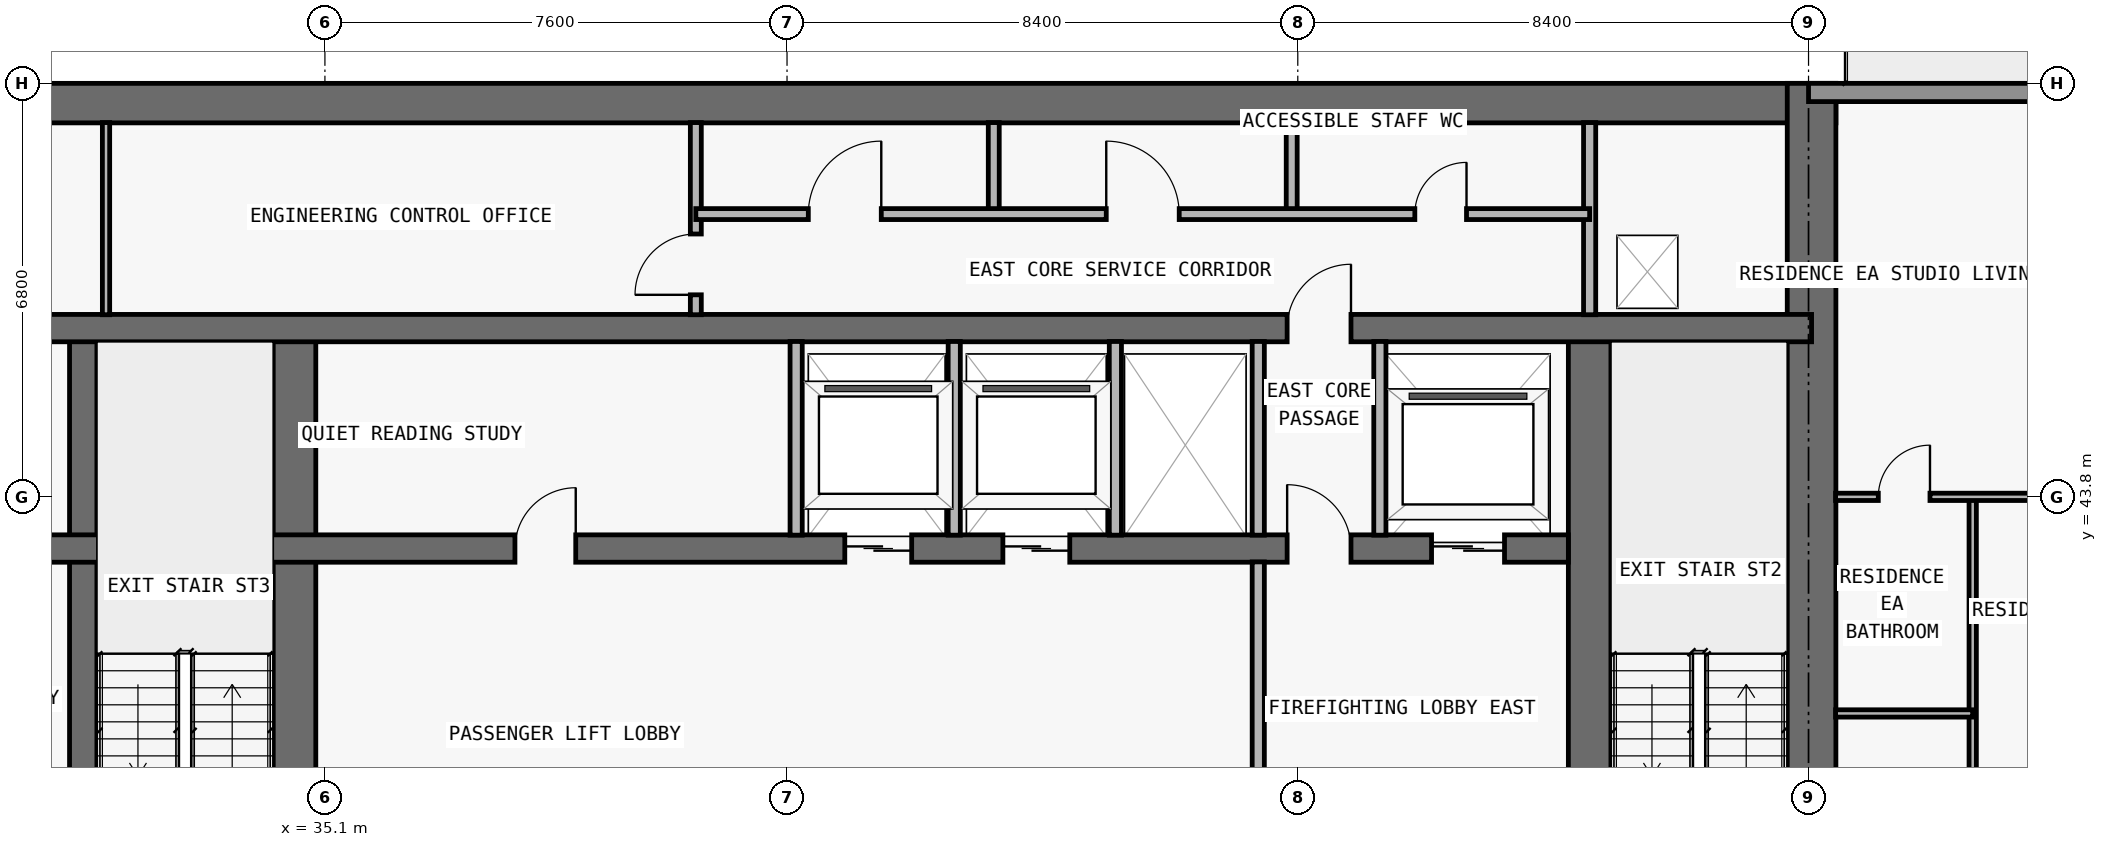
"""IFC4 building model, lengths in metres.
Left out: names, types, materials, properties, quantities, classifications, styles, units other than length and angle.
Written with IfcOpenShell. Run it as: python <this file> out.ifc"""

import sys

from ifc_helpers import new_model, si_unit, direction, frame, frame_2d, origin, place, context, subcontext, project, spatial, rectangle, extrude, element, fill, save


model = new_model("IFC4")
c1 = context("Model", 3, precision=1e-05, world=origin(), true_north=direction((0.0, 1.0)))
c2 = subcontext(c1, "Body", "Model", "MODEL_VIEW")
j1 = project(units=[si_unit("LENGTHUNIT", "METRE"), si_unit("PLANEANGLEUNIT", "RADIAN")], contexts=[c1])
p1 = place(None, origin())
s1 = spatial("IfcSite", under=j1, at=p1, CompositionType="ELEMENT")
p2 = place(p1, origin())
s2 = spatial("IfcBuilding", under=s1, at=p2, CompositionType="ELEMENT")
p3 = place(p2, frame((0.0, 0.0, 142.2)))
s3 = spatial("IfcBuildingStorey", under=s2, at=p3, CompositionType="ELEMENT", Elevation=142.2)
p4 = place(p3, frame((17.85, 50.275, 0.0), z_axis=(0.0, 0.0, 1.0), x_axis=(1.0, 0.0, 0.0)))
e1 = element("IfcWall", 1, at=p4, inside=s3, PredefinedType="SHEAR", context=c2, shape_type="SweptSolid", body=[
    extrude(rectangle(XDim=42.1, YDim=0.65, at=frame_2d((21.05, 0.0))), origin(), (0.0, 0.0, 1.0), 3.05),
])
p5 = place(p3, frame((59.55, 36.55, 0.0), z_axis=(0.0, 0.0, 1.0), x_axis=(0.0, 1.0, 0.0)))
e2 = element("IfcWall", 2, at=p5, inside=s3, PredefinedType="SHEAR", context=c2, shape_type="SweptSolid", body=[
    extrude(rectangle(XDim=14.05, YDim=0.8, at=frame_2d((7.025, 0.0))), origin(), (0.0, 0.0, 1.0), 3.05),
])
p6 = place(p3, frame((55.9, 36.95, 0.0), z_axis=(0.0, 0.0, 1.0), x_axis=(0.0, 1.0, 0.0)))
e3 = element("IfcWall", 3, at=p6, inside=s3, PredefinedType="SHEAR", context=c2, shape_type="SweptSolid", body=[
    extrude(rectangle(XDim=9.625, YDim=0.7, at=frame_2d((4.812, 0.0))), origin(), (0.0, 0.0, 1.0), 3.05),
])
p7 = place(p6, frame((0.6, 0.0, 0.0)))
e4 = element("IfcOpeningElement", 4, at=p7, cuts=e3, PredefinedType="OPENING", context=c2, shape_type="SweptSolid", body=[
    extrude(rectangle(XDim=1.1, YDim=2.15, at=frame_2d((0.55, 1.075))), frame((0.0, 0.36, 0.0), z_axis=(0.0, -1.0, 0.0), x_axis=(1.0, 0.0, 0.0)), (0.0, 0.0, 1.0), 0.72),
])
p8 = place(p3, frame((31.125, 36.95, 0.0), z_axis=(0.0, 0.0, 1.0), x_axis=(0.0, 1.0, 0.0)))
e5 = element("IfcWall", 5, at=p8, inside=s3, PredefinedType="SHEAR", context=c2, shape_type="SweptSolid", body=[
    extrude(rectangle(XDim=9.625, YDim=0.45, at=frame_2d((4.812, 0.0))), origin(), (0.0, 0.0, 1.0), 3.05),
])
p9 = place(p3, frame((34.6, 36.95, 0.0), z_axis=(0.0, 0.0, 1.0), x_axis=(0.0, 1.0, 0.0)))
e6 = element("IfcWall", 6, at=p9, inside=s3, PredefinedType="SHEAR", context=c2, shape_type="SweptSolid", body=[
    extrude(rectangle(XDim=9.625, YDim=0.7, at=frame_2d((4.812, 0.0))), origin(), (0.0, 0.0, 1.0), 3.05),
])
p10 = place(p3, frame((22.25, 42.95, 0.0), z_axis=(0.0, 0.0, 1.0), x_axis=(1.0, 0.0, 0.0)))
e7 = element("IfcWall", 7, at=p10, inside=s3, PredefinedType="SHEAR", context=c2, shape_type="SweptSolid", body=[
    extrude(rectangle(XDim=33.3, YDim=0.45, at=frame_2d((16.65, 0.0))), origin(), (0.0, 0.0, 1.0), 3.05),
])
p11 = place(p10, frame((1.05, 0.0, 0.0)))
e8 = element("IfcOpeningElement", 8, at=p11, cuts=e7, PredefinedType="OPENING", context=c2, shape_type="SweptSolid", body=[
    extrude(rectangle(XDim=1.2, YDim=2.2, at=frame_2d((0.6, 1.1))), frame((0.0, 0.235, 0.0), z_axis=(0.0, -1.0, 0.0), x_axis=(1.0, 0.0, 0.0)), (0.0, 0.0, 1.0), 0.47),
])
p12 = place(p10, frame((31.05, 0.0, 0.0)))
e9 = element("IfcOpeningElement", 9, at=p12, cuts=e7, PredefinedType="OPENING", context=c2, shape_type="SweptSolid", body=[
    extrude(rectangle(XDim=1.2, YDim=2.2, at=frame_2d((0.6, 1.1))), frame((0.0, 0.235, 0.0), z_axis=(0.0, -1.0, 0.0), x_axis=(1.0, 0.0, 0.0)), (0.0, 0.0, 1.0), 0.47),
])
p13 = place(p10, frame((21.4, 0.0, 0.0)))
e10 = element("IfcOpeningElement", 10, at=p13, cuts=e7, PredefinedType="OPENING", context=c2, shape_type="SweptSolid", body=[
    extrude(rectangle(XDim=1.1, YDim=2.2, at=frame_2d((0.55, 1.1))), frame((0.0, 0.235, 0.0), z_axis=(0.0, -1.0, 0.0), x_axis=(1.0, 0.0, 0.0)), (0.0, 0.0, 1.0), 0.47),
])
p14 = place(p10, frame((24.0, 0.0, 0.0)))
e11 = element("IfcOpeningElement", 11, at=p14, cuts=e7, PredefinedType="OPENING", context=c2, shape_type="SweptSolid", body=[
    extrude(rectangle(XDim=1.1, YDim=2.2, at=frame_2d((0.55, 1.1))), frame((0.0, 0.235, 0.0), z_axis=(0.0, -1.0, 0.0), x_axis=(1.0, 0.0, 0.0)), (0.0, 0.0, 1.0), 0.47),
])
p15 = place(p10, frame((3.625, 0.0, 0.0)))
e12 = element("IfcOpeningElement", 12, at=p15, cuts=e7, PredefinedType="OPENING", context=c2, shape_type="SweptSolid", body=[
    extrude(rectangle(XDim=1.05, YDim=2.15, at=frame_2d((0.525, 1.075))), frame((0.0, 0.235, 0.0), z_axis=(0.0, -1.0, 0.0), x_axis=(1.0, 0.0, 0.0)), (0.0, 0.0, 1.0), 0.47),
])
p16 = place(p10, frame((28.675, 0.0, 0.0)))
e13 = element("IfcOpeningElement", 13, at=p16, cuts=e7, PredefinedType="OPENING", context=c2, shape_type="SweptSolid", body=[
    extrude(rectangle(XDim=1.05, YDim=2.15, at=frame_2d((0.525, 1.075))), frame((0.0, 0.235, 0.0), z_axis=(0.0, -1.0, 0.0), x_axis=(1.0, 0.0, 0.0)), (0.0, 0.0, 1.0), 0.47),
])
p17 = place(p10, frame((15.975, 0.0, 0.0)))
e14 = element("IfcOpeningElement", 14, at=p17, cuts=e7, PredefinedType="OPENING", context=c2, shape_type="SweptSolid", body=[
    extrude(rectangle(XDim=1.0, YDim=2.2, at=frame_2d((0.5, 1.1))), frame((0.0, 0.235, 0.0), z_axis=(0.0, -1.0, 0.0), x_axis=(1.0, 0.0, 0.0)), (0.0, 0.0, 1.0), 0.47),
])
p18 = place(p3, frame((18.25, 46.575, 0.0), z_axis=(0.0, 0.0, 1.0), x_axis=(1.0, 0.0, 0.0)))
e15 = element("IfcWall", 15, at=p18, inside=s3, PredefinedType="SHEAR", context=c2, shape_type="SweptSolid", body=[
    extrude(rectangle(XDim=41.3, YDim=0.45, at=frame_2d((20.65, 0.0))), origin(), (0.0, 0.0, 1.0), 3.05),
])
p19 = place(p18, frame((7.65, 0.0, 0.0)))
e16 = element("IfcOpeningElement", 16, at=p19, cuts=e15, PredefinedType="OPENING", context=c2, shape_type="SweptSolid", body=[
    extrude(rectangle(XDim=1.0, YDim=2.2, at=frame_2d((0.5, 1.1))), frame((0.0, 0.235, 0.0), z_axis=(0.0, -1.0, 0.0), x_axis=(1.0, 0.0, 0.0)), (0.0, 0.0, 1.0), 0.47),
])
p20 = place(p18, frame((32.675, 0.0, 0.0)))
e17 = element("IfcOpeningElement", 17, at=p20, cuts=e15, PredefinedType="OPENING", context=c2, shape_type="SweptSolid", body=[
    extrude(rectangle(XDim=1.05, YDim=2.15, at=frame_2d((0.525, 1.075))), frame((0.0, 0.235, 0.0), z_axis=(0.0, -1.0, 0.0), x_axis=(1.0, 0.0, 0.0)), (0.0, 0.0, 1.0), 0.47),
])
p21 = place(p3, frame((59.5, 50.45, 0.0), z_axis=(0.0, 0.0, 1.0), x_axis=(1.0, 0.0, 0.0)))
e18 = element("IfcWall", 18, at=p21, inside=s3, PredefinedType="STANDARD", context=c2, shape_type="SweptSolid", body=[
    extrude(rectangle(XDim=10.6, YDim=0.3, at=frame_2d((5.3, 0.0))), origin(), (0.0, 0.0, 1.0), 3.05),
])
p22 = place(p21, frame((4.3, 0.0, 0.0)))
e19 = element("IfcOpeningElement", 19, at=p22, cuts=e18, PredefinedType="OPENING", context=c2, shape_type="SweptSolid", body=[
    extrude(rectangle(XDim=2.0, YDim=2.3, at=frame_2d((1.0, 1.15))), frame((0.0, 0.16, 0.0), z_axis=(0.0, -1.0, 0.0), x_axis=(1.0, 0.0, 0.0)), (0.0, 0.0, 1.0), 0.32),
])
p23 = place(p3, frame((31.5, 46.795, 0.0), z_axis=(0.0, 0.0, 1.0), x_axis=(0.0, 1.0, 0.0)))
e20 = element("IfcWall", 20, at=p23, inside=s3, PredefinedType="PARTITIONING", context=c2, shape_type="SweptSolid", body=[
    extrude(rectangle(XDim=3.16, YDim=0.12, at=frame_2d((1.58, 0.0))), origin(), (0.0, 0.0, 1.0), 3.05),
])
p24 = place(p3, frame((41.2, 46.795, 0.0), z_axis=(0.0, 0.0, 1.0), x_axis=(0.0, 1.0, 0.0)))
e21 = element("IfcWall", 21, at=p24, inside=s3, PredefinedType="PARTITIONING", context=c2, shape_type="SweptSolid", body=[
    extrude(rectangle(XDim=3.16, YDim=0.18, at=frame_2d((1.58, 0.0))), origin(), (0.0, 0.0, 1.0), 3.05),
])
p25 = place(p24, frame((0.327, 0.0, 0.0)))
e22 = element("IfcOpeningElement", 22, at=p25, cuts=e21, PredefinedType="OPENING", context=c2, shape_type="SweptSolid", body=[
    extrude(rectangle(XDim=1.0, YDim=2.2, at=frame_2d((0.5, 1.1))), frame((0.0, 0.1, 0.0), z_axis=(0.0, -1.0, 0.0), x_axis=(1.0, 0.0, 0.0)), (0.0, 0.0, 1.0), 0.2),
])
for number, where, z_axis, x_axis in (
    (23, (42.85, 43.17, 0.0), (0.0, 0.0, 1.0), (0.0, 1.0, 0.0)),
    (24, (45.45, 43.17, 0.0), (0.0, 0.0, 1.0), (0.0, 1.0, 0.0)),
):
    element("IfcWall", number, at=place(p3, frame(where, z_axis=z_axis, x_axis=x_axis)), inside=s3, PredefinedType="PARTITIONING", context=c2, shape_type="SweptSolid", body=[
        extrude(rectangle(XDim=3.185, YDim=0.2, at=frame_2d((1.593, 0.0))), origin(), (0.0, 0.0, 1.0), 3.05),
    ])
p26 = place(p3, frame((46.1, 48.45, 0.0), z_axis=(0.0, 0.0, 1.0), x_axis=(0.0, 1.0, 0.0)))
e25 = element("IfcWall", 25, at=p26, inside=s3, PredefinedType="PARTITIONING", context=c2, shape_type="SweptSolid", body=[
    extrude(rectangle(XDim=1.505, YDim=0.18, at=frame_2d((0.752, 0.0))), origin(), (0.0, 0.0, 1.0), 3.05),
])
p27 = place(p3, frame((48.1, 43.17, 0.0), z_axis=(0.0, 0.0, 1.0), x_axis=(0.0, 1.0, 0.0)))
e26 = element("IfcWall", 26, at=p27, inside=s3, PredefinedType="PARTITIONING", context=c2, shape_type="SweptSolid", body=[
    extrude(rectangle(XDim=3.185, YDim=0.2, at=frame_2d((1.593, 0.0))), origin(), (0.0, 0.0, 1.0), 3.05),
])
p28 = place(p3, frame((50.45, 37.345, 0.0), z_axis=(0.0, 0.0, 1.0), x_axis=(0.0, 1.0, 0.0)))
e27 = element("IfcWall", 27, at=p28, inside=s3, PredefinedType="PARTITIONING", context=c2, shape_type="SweptSolid", body=[
    extrude(rectangle(XDim=5.385, YDim=0.2, at=frame_2d((2.692, 0.0))), origin(), (0.0, 0.0, 1.0), 3.05),
])
p29 = place(p3, frame((50.45, 43.17, 0.0), z_axis=(0.0, 0.0, 1.0), x_axis=(0.0, 1.0, 0.0)))
e28 = element("IfcWall", 28, at=p29, inside=s3, PredefinedType="PARTITIONING", context=c2, shape_type="SweptSolid", body=[
    extrude(rectangle(XDim=3.185, YDim=0.2, at=frame_2d((1.593, 0.0))), origin(), (0.0, 0.0, 1.0), 3.05),
])
p30 = place(p3, frame((51.0, 48.45, 0.0), z_axis=(0.0, 0.0, 1.0), x_axis=(0.0, 1.0, 0.0)))
e29 = element("IfcWall", 29, at=p30, inside=s3, PredefinedType="PARTITIONING", context=c2, shape_type="SweptSolid", body=[
    extrude(rectangle(XDim=1.505, YDim=0.18, at=frame_2d((0.752, 0.0))), origin(), (0.0, 0.0, 1.0), 3.05),
])
p31 = place(p3, frame((52.45, 43.17, 0.0), z_axis=(0.0, 0.0, 1.0), x_axis=(0.0, 1.0, 0.0)))
e30 = element("IfcWall", 30, at=p31, inside=s3, PredefinedType="PARTITIONING", context=c2, shape_type="SweptSolid", body=[
    extrude(rectangle(XDim=3.185, YDim=0.2, at=frame_2d((1.593, 0.0))), origin(), (0.0, 0.0, 1.0), 3.05),
])
p32 = place(p3, frame((55.9, 46.795, 0.0), z_axis=(0.0, 0.0, 1.0), x_axis=(0.0, 1.0, 0.0)))
e31 = element("IfcWall", 31, at=p32, inside=s3, PredefinedType="PARTITIONING", context=c2, shape_type="SweptSolid", body=[
    extrude(rectangle(XDim=3.16, YDim=0.2, at=frame_2d((1.58, 0.0))), origin(), (0.0, 0.0, 1.0), 3.05),
])
p33 = place(p3, frame((62.2, 36.95, 0.0), z_axis=(0.0, 0.0, 1.0), x_axis=(0.0, 1.0, 0.0)))
e32 = element("IfcWall", 32, at=p33, inside=s3, PredefinedType="PARTITIONING", context=c2, shape_type="SweptSolid", body=[
    extrude(rectangle(XDim=6.85, YDim=0.12, at=frame_2d((3.425, 0.0))), origin(), (0.0, 0.0, 1.0), 3.05),
])
p34 = place(p33, frame((1.219, 0.0, 0.0)))
e33 = element("IfcOpeningElement", 33, at=p34, cuts=e32, PredefinedType="OPENING", context=c2, shape_type="SweptSolid", body=[
    extrude(rectangle(XDim=0.85, YDim=2.1, at=frame_2d((0.425, 1.05))), frame((0.0, 0.07, 0.0), z_axis=(0.0, -1.0, 0.0), x_axis=(1.0, 0.0, 0.0)), (0.0, 0.0, 1.0), 0.14),
])
p35 = place(p3, frame((59.945, 40.238, 0.0), z_axis=(0.0, 0.0, 1.0), x_axis=(1.0, 0.0, 0.0)))
e34 = element("IfcWall", 34, at=p35, inside=s3, PredefinedType="PARTITIONING", context=c2, shape_type="SweptSolid", body=[
    extrude(rectangle(XDim=2.255, YDim=0.12, at=frame_2d((1.127, 0.0))), origin(), (0.0, 0.0, 1.0), 3.05),
])
p36 = place(p3, frame((59.945, 43.8, 0.0), z_axis=(0.0, 0.0, 1.0), x_axis=(1.0, 0.0, 0.0)))
e35 = element("IfcWall", 35, at=p36, inside=s3, PredefinedType="PARTITIONING", context=c2, shape_type="SweptSolid", body=[
    extrude(rectangle(XDim=13.66, YDim=0.12, at=frame_2d((6.83, 0.0))), origin(), (0.0, 0.0, 1.0), 2.339),
])
p37 = place(p36, frame((4.017, 0.0, 0.0)))
e36 = element("IfcOpeningElement", 36, at=p37, cuts=e35, PredefinedType="OPENING", context=c2, shape_type="SweptSolid", body=[
    extrude(rectangle(XDim=0.9, YDim=2.15, at=frame_2d((0.45, 1.075))), frame((0.0, 0.07, 0.0), z_axis=(0.0, -1.0, 0.0), x_axis=(1.0, 0.0, 0.0)), (0.0, 0.0, 1.0), 0.14),
])
p38 = place(p36, frame((0.702, 0.0, 0.0)))
e37 = element("IfcOpeningElement", 37, at=p38, cuts=e35, PredefinedType="OPENING", context=c2, shape_type="SweptSolid", body=[
    extrude(rectangle(XDim=0.85, YDim=2.1, at=frame_2d((0.425, 1.05))), frame((0.0, 0.07, 0.0), z_axis=(0.0, -1.0, 0.0), x_axis=(1.0, 0.0, 0.0)), (0.0, 0.0, 1.0), 0.14),
])
p39 = place(p3, frame((41.2, 48.45, 0.0), z_axis=(0.0, 0.0, 1.0), x_axis=(1.0, 0.0, 0.0)))
e38 = element("IfcWall", 38, at=p39, inside=s3, PredefinedType="PARTITIONING", context=c2, shape_type="SweptSolid", body=[
    extrude(rectangle(XDim=14.7, YDim=0.18, at=frame_2d((7.35, 0.0))), origin(), (0.0, 0.0, 1.0), 3.05),
])
p40 = place(p39, frame((1.85, 0.0, 0.0)))
e39 = element("IfcOpeningElement", 39, at=p40, cuts=e38, PredefinedType="OPENING", context=c2, shape_type="SweptSolid", body=[
    extrude(rectangle(XDim=1.2, YDim=2.2, at=frame_2d((0.6, 1.1))), frame((0.0, 0.1, 0.0), z_axis=(0.0, -1.0, 0.0), x_axis=(1.0, 0.0, 0.0)), (0.0, 0.0, 1.0), 0.2),
])
p41 = place(p39, frame((6.75, 0.0, 0.0)))
e40 = element("IfcOpeningElement", 40, at=p41, cuts=e38, PredefinedType="OPENING", context=c2, shape_type="SweptSolid", body=[
    extrude(rectangle(XDim=1.2, YDim=2.2, at=frame_2d((0.6, 1.1))), frame((0.0, 0.1, 0.0), z_axis=(0.0, -1.0, 0.0), x_axis=(1.0, 0.0, 0.0)), (0.0, 0.0, 1.0), 0.2),
])
p42 = place(p39, frame((11.825, 0.0, 0.0)))
e41 = element("IfcOpeningElement", 41, at=p42, cuts=e38, PredefinedType="OPENING", context=c2, shape_type="SweptSolid", body=[
    extrude(rectangle(XDim=0.85, YDim=2.1, at=frame_2d((0.425, 1.05))), frame((0.0, 0.1, 0.0), z_axis=(0.0, -1.0, 0.0), x_axis=(1.0, 0.0, 0.0)), (0.0, 0.0, 1.0), 0.2),
])
p43 = place(p12, origin())
e42 = element("IfcDoor", 42, at=p43, inside=s3, OperationType="DOUBLE_DOOR_SLIDING", PredefinedType="DOOR", context=c2, shape_type="SweptSolid", body=[
    extrude(rectangle(XDim=1.2, YDim=2.2, at=frame_2d((0.6, 1.1))), frame((0.0, 0.025, 0.0), z_axis=(0.0, -1.0, 0.0), x_axis=(1.0, 0.0, 0.0)), (0.0, 0.0, 1.0), 0.05),
])
fill(e9, e42)
p44 = place(p13, origin())
e43 = element("IfcDoor", 43, at=p44, inside=s3, OperationType="DOUBLE_DOOR_SLIDING", PredefinedType="DOOR", context=c2, shape_type="SweptSolid", body=[
    extrude(rectangle(XDim=1.1, YDim=2.2, at=frame_2d((0.55, 1.1))), frame((0.0, 0.025, 0.0), z_axis=(0.0, -1.0, 0.0), x_axis=(1.0, 0.0, 0.0)), (0.0, 0.0, 1.0), 0.05),
])
fill(e10, e43)
p45 = place(p14, origin())
e44 = element("IfcDoor", 44, at=p45, inside=s3, OperationType="DOUBLE_DOOR_SLIDING", PredefinedType="DOOR", context=c2, shape_type="SweptSolid", body=[
    extrude(rectangle(XDim=1.1, YDim=2.2, at=frame_2d((0.55, 1.1))), frame((0.0, 0.025, 0.0), z_axis=(0.0, -1.0, 0.0), x_axis=(1.0, 0.0, 0.0)), (0.0, 0.0, 1.0), 0.05),
])
fill(e11, e44)
p46 = place(p16, origin())
e45 = element("IfcDoor", 45, at=p46, inside=s3, OperationType="SINGLE_SWING_LEFT", PredefinedType="DOOR", context=c2, shape_type="SweptSolid", body=[
    extrude(rectangle(XDim=1.05, YDim=2.15, at=frame_2d((0.525, 1.075))), frame((0.0, 0.025, 0.0), z_axis=(0.0, -1.0, 0.0), x_axis=(1.0, 0.0, 0.0)), (0.0, 0.0, 1.0), 0.05),
])
fill(e13, e45)
p47 = place(p17, origin())
e46 = element("IfcDoor", 46, at=p47, inside=s3, OperationType="SINGLE_SWING_RIGHT", PredefinedType="DOOR", context=c2, shape_type="SweptSolid", body=[
    extrude(rectangle(XDim=1.0, YDim=2.2, at=frame_2d((0.5, 1.1))), frame((0.0, 0.025, 0.0), z_axis=(0.0, -1.0, 0.0), x_axis=(1.0, 0.0, 0.0)), (0.0, 0.0, 1.0), 0.05),
])
fill(e14, e46)
p48 = place(p20, origin())
e47 = element("IfcDoor", 47, at=p48, inside=s3, OperationType="SINGLE_SWING_RIGHT", PredefinedType="DOOR", context=c2, shape_type="SweptSolid", body=[
    extrude(rectangle(XDim=1.05, YDim=2.15, at=frame_2d((0.525, 1.075))), frame((0.0, 0.025, 0.0), z_axis=(0.0, -1.0, 0.0), x_axis=(1.0, 0.0, 0.0)), (0.0, 0.0, 1.0), 0.05),
])
fill(e17, e47)
p49 = place(p25, origin())
e48 = element("IfcDoor", 48, at=p49, inside=s3, OperationType="SINGLE_SWING_LEFT", PredefinedType="DOOR", context=c2, shape_type="SweptSolid", body=[
    extrude(rectangle(XDim=1.0, YDim=2.2, at=frame_2d((0.5, 1.1))), frame((0.0, 0.025, 0.0), z_axis=(0.0, -1.0, 0.0), x_axis=(1.0, 0.0, 0.0)), (0.0, 0.0, 1.0), 0.05),
])
fill(e22, e48)
p50 = place(p40, origin())
e49 = element("IfcDoor", 49, at=p50, inside=s3, OperationType="SINGLE_SWING_RIGHT", PredefinedType="DOOR", context=c2, shape_type="SweptSolid", body=[
    extrude(rectangle(XDim=1.2, YDim=2.2, at=frame_2d((0.6, 1.1))), frame((0.0, 0.025, 0.0), z_axis=(0.0, -1.0, 0.0), x_axis=(1.0, 0.0, 0.0)), (0.0, 0.0, 1.0), 0.05),
])
fill(e39, e49)
p51 = place(p41, origin())
e50 = element("IfcDoor", 50, at=p51, inside=s3, OperationType="SINGLE_SWING_LEFT", PredefinedType="DOOR", context=c2, shape_type="SweptSolid", body=[
    extrude(rectangle(XDim=1.2, YDim=2.2, at=frame_2d((0.6, 1.1))), frame((0.0, 0.025, 0.0), z_axis=(0.0, -1.0, 0.0), x_axis=(1.0, 0.0, 0.0)), (0.0, 0.0, 1.0), 0.05),
])
fill(e40, e50)
p52 = place(p42, origin())
e51 = element("IfcDoor", 51, at=p52, inside=s3, OperationType="SINGLE_SWING_RIGHT", PredefinedType="DOOR", context=c2, shape_type="SweptSolid", body=[
    extrude(rectangle(XDim=0.85, YDim=2.1, at=frame_2d((0.425, 1.05))), frame((0.0, 0.025, 0.0), z_axis=(0.0, -1.0, 0.0), x_axis=(1.0, 0.0, 0.0)), (0.0, 0.0, 1.0), 0.05),
])
fill(e41, e51)
p53 = place(p38, origin())
e52 = element("IfcDoor", 52, at=p53, inside=s3, OperationType="SINGLE_SWING_RIGHT", PredefinedType="DOOR", context=c2, shape_type="SweptSolid", body=[
    extrude(rectangle(XDim=0.85, YDim=2.1, at=frame_2d((0.425, 1.05))), frame((0.0, 0.025, 0.0), z_axis=(0.0, -1.0, 0.0), x_axis=(1.0, 0.0, 0.0)), (0.0, 0.0, 1.0), 0.05),
])
fill(e37, e52)
save(model, sys.argv[1])
